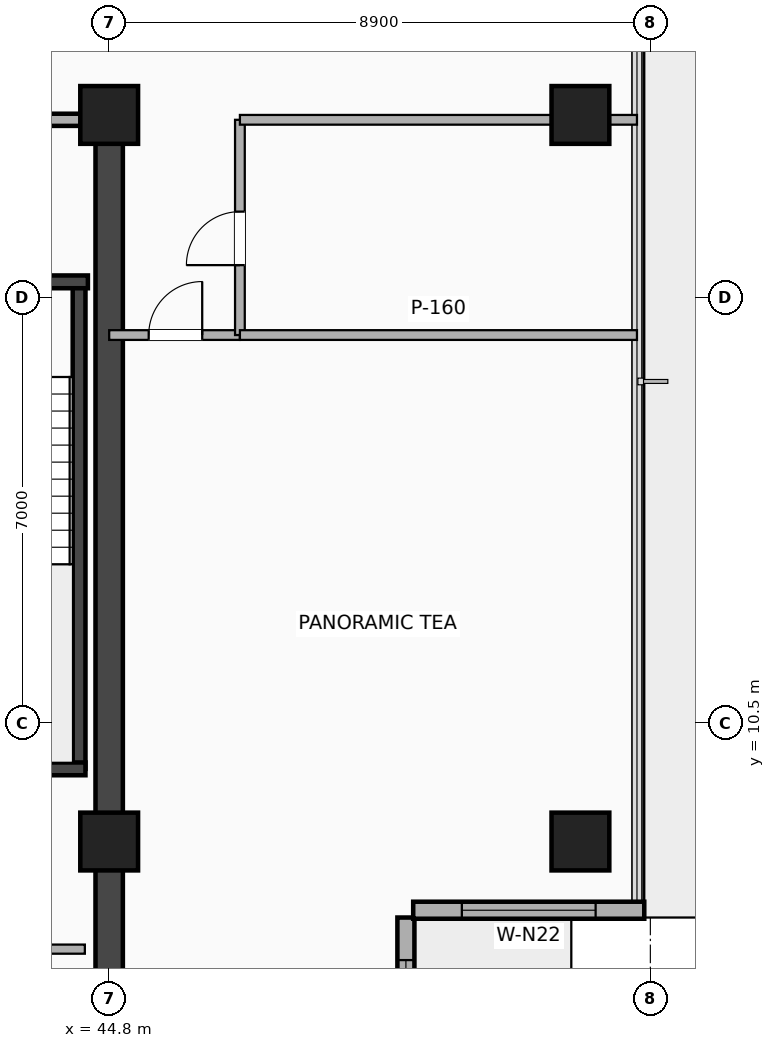
"""IFC4 building model, lengths in metres.
Left out: names, types, materials, properties, quantities, classifications, styles, units other than length and angle.
Written with IfcOpenShell. Run it as: python <this file> out.ifc"""

import sys

from ifc_helpers import new_model, si_unit, direction, frame, frame_2d, origin, origin_2d, place, context, subcontext, project, spatial, rectangle, extrude, element, fill, save


model = new_model("IFC4")
c1 = context("Model", 3, precision=1e-05, world=origin(), true_north=direction((0.0, 1.0)))
c2 = subcontext(c1, "Body", "Model", "MODEL_VIEW")
j1 = project(units=[si_unit("LENGTHUNIT", "METRE"), si_unit("PLANEANGLEUNIT", "RADIAN")], contexts=[c1])
p1 = place(None, origin())
s1 = spatial("IfcSite", under=j1, at=p1, CompositionType="ELEMENT")
p2 = place(p1, origin())
s2 = spatial("IfcBuilding", under=s1, at=p2, CompositionType="ELEMENT")
p3 = place(p2, frame((0.0, 0.0, 192.5)))
s3 = spatial("IfcBuildingStorey", under=s2, at=p3, CompositionType="ELEMENT", Elevation=192.5)
p4 = place(p3, frame((44.8, 3.5, 0.0), z_axis=(0.0, 0.0, 1.0), x_axis=(0.0, 1.0, 0.0)))
e1 = element("IfcWall", 1, at=p4, inside=s3, PredefinedType="SHEAR", context=c2, shape_type="SweptSolid", body=[
    extrude(rectangle(XDim=16.9, YDim=0.45, at=frame_2d((8.45, 0.0))), origin(), (0.0, 0.0, 1.0), 4.16),
])
p5 = place(p3, frame((44.305, 9.745, 0.0), z_axis=(0.0, 0.0, 1.0), x_axis=(0.0, 1.0, 0.0)))
e2 = element("IfcWall", 2, at=p5, inside=s3, PredefinedType="SHEAR", context=c2, shape_type="SweptSolid", body=[
    extrude(rectangle(XDim=8.01, YDim=0.21, at=frame_2d((4.005, 0.0))), origin(), (0.0, 0.0, 1.0), 4.16),
])
p6 = place(p3, frame((40.75, 9.745, 0.0), z_axis=(0.0, 0.0, 1.0), x_axis=(1.0, 0.0, 0.0)))
e3 = element("IfcWall", 3, at=p6, inside=s3, PredefinedType="SHEAR", context=c2, shape_type="SweptSolid", body=[
    extrude(rectangle(XDim=3.66, YDim=0.21, at=frame_2d((1.83, 0.0))), origin(), (0.0, 0.0, 1.0), 4.16),
])
p7 = place(p3, frame((37.25, 17.755, 0.0), z_axis=(0.0, 0.0, 1.0), x_axis=(1.0, 0.0, 0.0)))
e4 = element("IfcWall", 4, at=p7, inside=s3, PredefinedType="SHEAR", context=c2, shape_type="SweptSolid", body=[
    extrude(rectangle(XDim=7.2, YDim=0.21, at=frame_2d((3.6, 0.0))), origin(), (0.0, 0.0, 1.0), 4.16),
])
p8 = place(p7, frame((0.25, 0.0, 0.0)))
e5 = element("IfcOpeningElement", 5, at=p8, cuts=e4, PredefinedType="OPENING", context=c2, shape_type="SweptSolid", body=[
    extrude(rectangle(XDim=1.12, YDim=2.2, at=frame_2d((0.56, 1.1))), frame((0.0, 0.115, 0.0), z_axis=(0.0, -1.0, 0.0), x_axis=(1.0, 0.0, 0.0)), (0.0, 0.0, 1.0), 0.23),
])
p9 = place(p7, frame((2.05, 0.0, 0.0)))
e6 = element("IfcOpeningElement", 6, at=p9, cuts=e4, PredefinedType="OPENING", context=c2, shape_type="SweptSolid", body=[
    extrude(rectangle(XDim=1.1, YDim=2.18, at=frame_2d((0.55, 1.09))), frame((0.0, 0.115, 0.0), z_axis=(0.0, -1.0, 0.0), x_axis=(1.0, 0.0, 0.0)), (0.0, 0.0, 1.0), 0.23),
])
p10 = place(p7, frame((5.78, 0.0, 0.0), z_axis=(0.0, 0.0, 1.0), x_axis=(-1.0, 0.0, 0.0)))
e7 = element("IfcOpeningElement", 7, at=p10, cuts=e4, PredefinedType="OPENING", context=c2, shape_type="SweptSolid", body=[
    extrude(rectangle(XDim=1.05, YDim=2.15, at=frame_2d((0.525, 1.075))), frame((0.0, 0.115, 0.0), z_axis=(0.0, -1.0, 0.0), x_axis=(1.0, 0.0, 0.0)), (0.0, 0.0, 1.0), 0.23),
])
for number, where, z_axis, x_axis in (
    (8, (44.8, 8.55, -0.24), (0.0, 0.0, 1.0), (1.0, 0.0, 0.0)),
    (9, (44.8, 20.5, -0.24), (0.0, 0.0, 1.0), (1.0, 0.0, 0.0)),
    (10, (52.55, 8.55, -0.24), (0.0, 0.0, 1.0), (1.0, 0.0, 0.0)),
    (11, (52.55, 20.5, -0.24), (0.0, 0.0, 1.0), (1.0, 0.0, 0.0)),
):
    element("IfcColumn", number, at=place(p3, frame(where, z_axis=z_axis, x_axis=x_axis)), inside=s3, PredefinedType="COLUMN", context=c2, shape_type="SweptSolid", body=[
        extrude(rectangle(XDim=0.95, YDim=0.95, at=origin_2d()), origin(), (0.0, 0.0, 1.0), 4.4),
    ])
p11 = place(p3, frame((49.68, 3.5, 0.0), z_axis=(0.0, 0.0, 1.0), x_axis=(0.0, 1.0, 0.0)))
e12 = element("IfcWall", 12, at=p11, inside=s3, PredefinedType="SOLIDWALL", context=c2, shape_type="SweptSolid", body=[
    extrude(rectangle(XDim=3.8, YDim=0.28, at=frame_2d((1.9, 0.0))), origin(), (0.0, 0.0, 1.0), 4.16),
])
p12 = place(p11, frame((0.7, 0.0, 0.85)))
e13 = element("IfcOpeningElement", 13, at=p12, cuts=e12, PredefinedType="OPENING", context=c2, shape_type="SweptSolid", body=[
    extrude(rectangle(XDim=2.4, YDim=1.65, at=frame_2d((1.2, 0.825))), frame((0.0, 0.15, 0.0), z_axis=(0.0, -1.0, 0.0), x_axis=(1.0, 0.0, 0.0)), (0.0, 0.0, 1.0), 0.3),
])
p13 = place(p3, frame((49.8, 7.42, 0.0), z_axis=(0.0, 0.0, 1.0), x_axis=(1.0, 0.0, 0.0)))
e14 = element("IfcWall", 14, at=p13, inside=s3, PredefinedType="SOLIDWALL", context=c2, shape_type="SweptSolid", body=[
    extrude(rectangle(XDim=3.8, YDim=0.28, at=frame_2d((1.9, 0.0))), origin(), (0.0, 0.0, 1.0), 4.16),
])
p14 = place(p13, frame((0.8, 0.0, 0.85)))
e15 = element("IfcOpeningElement", 15, at=p14, cuts=e14, PredefinedType="OPENING", context=c2, shape_type="SweptSolid", body=[
    extrude(rectangle(XDim=2.2, YDim=1.65, at=frame_2d((1.1, 0.825))), frame((0.0, 0.15, 0.0), z_axis=(0.0, -1.0, 0.0), x_axis=(1.0, 0.0, 0.0)), (0.0, 0.0, 1.0), 0.3),
])
p15 = place(p3, frame((37.0, 20.42, 0.0), z_axis=(0.0, 0.0, 1.0), x_axis=(1.0, 0.0, 0.0)))
e16 = element("IfcWall", 16, at=p15, inside=s3, PredefinedType="PARTITIONING", context=c2, shape_type="SweptSolid", body=[
    extrude(rectangle(XDim=7.45, YDim=0.2, at=frame_2d((3.725, 0.0))), origin(), (0.0, 0.0, 1.0), 3.372),
])
p16 = place(p15, frame((4.2, 0.0, 0.0)))
e17 = element("IfcOpeningElement", 17, at=p16, cuts=e16, PredefinedType="OPENING", context=c2, shape_type="SweptSolid", body=[
    extrude(rectangle(XDim=1.1, YDim=2.15, at=frame_2d((0.55, 1.075))), frame((0.0, 0.11, 0.0), z_axis=(0.0, -1.0, 0.0), x_axis=(1.0, 0.0, 0.0)), (0.0, 0.0, 1.0), 0.22),
])
p17 = place(p3, frame((41.74, 6.78, 0.0), z_axis=(0.0, 0.0, 1.0), x_axis=(1.0, 0.0, 0.0)))
e18 = element("IfcWall", 18, at=p17, inside=s3, PredefinedType="PARTITIONING", context=c2, shape_type="SweptSolid", body=[
    extrude(rectangle(XDim=2.66, YDim=0.15, at=frame_2d((1.33, 0.0))), origin(), (0.0, 0.0, 1.0), 3.372),
])
p18 = place(p3, frame((44.8, 16.88, 0.0), z_axis=(0.0, 0.0, 1.0), x_axis=(1.0, 0.0, 0.0)))
e19 = element("IfcWall", 19, at=p18, inside=s3, PredefinedType="PARTITIONING", context=c2, shape_type="SweptSolid", body=[
    extrude(rectangle(XDim=2.15, YDim=0.16, at=frame_2d((1.075, 0.0))), origin(), (0.0, 0.0, 1.0), 3.372),
])
p19 = place(p18, frame((1.53, 0.0, 0.0), z_axis=(0.0, 0.0, 1.0), x_axis=(-1.0, 0.0, 0.0)))
e20 = element("IfcOpeningElement", 20, at=p19, cuts=e19, PredefinedType="OPENING", context=c2, shape_type="SweptSolid", body=[
    extrude(rectangle(XDim=0.88, YDim=2.08, at=frame_2d((0.44, 1.04))), frame((0.0, 0.09, 0.0), z_axis=(0.0, -1.0, 0.0), x_axis=(1.0, 0.0, 0.0)), (0.0, 0.0, 1.0), 0.18),
])
p20 = place(p3, frame((46.95, 16.88, 0.0), z_axis=(0.0, 0.0, 1.0), x_axis=(0.0, 1.0, 0.0)))
e21 = element("IfcWall", 21, at=p20, inside=s3, PredefinedType="PARTITIONING", context=c2, shape_type="SweptSolid", body=[
    extrude(rectangle(XDim=3.54, YDim=0.16, at=frame_2d((1.77, 0.0))), origin(), (0.0, 0.0, 1.0), 3.372),
])
p21 = place(p20, frame((2.03, 0.0, 0.0), z_axis=(0.0, 0.0, 1.0), x_axis=(-1.0, 0.0, 0.0)))
e22 = element("IfcOpeningElement", 22, at=p21, cuts=e21, PredefinedType="OPENING", context=c2, shape_type="SweptSolid", body=[
    extrude(rectangle(XDim=0.88, YDim=2.08, at=frame_2d((0.44, 1.04))), frame((0.0, 0.09, 0.0), z_axis=(0.0, -1.0, 0.0), x_axis=(1.0, 0.0, 0.0)), (0.0, 0.0, 1.0), 0.18),
])
p22 = place(p3, frame((46.95, 16.88, 0.0), z_axis=(0.0, 0.0, 1.0), x_axis=(1.0, 0.0, 0.0)))
e23 = element("IfcWall", 23, at=p22, inside=s3, PredefinedType="PARTITIONING", context=c2, shape_type="SweptSolid", body=[
    extrude(rectangle(XDim=6.53, YDim=0.16, at=frame_2d((3.265, 0.0))), origin(), (0.0, 0.0, 1.0), 3.682),
])
p23 = place(p3, frame((46.95, 20.42, 0.0), z_axis=(0.0, 0.0, 1.0), x_axis=(1.0, 0.0, 0.0)))
e24 = element("IfcWall", 24, at=p23, inside=s3, PredefinedType="PARTITIONING", context=c2, shape_type="SweptSolid", body=[
    extrude(rectangle(XDim=6.53, YDim=0.16, at=frame_2d((3.265, 0.0))), origin(), (0.0, 0.0, 1.0), 3.372),
])
p24 = place(p12, origin())
e25 = element("IfcWindow", 25, at=p24, inside=s3, PartitioningType="SINGLE_PANEL", PredefinedType="WINDOW", context=c2, shape_type="SweptSolid", body=[
    extrude(rectangle(XDim=2.4, YDim=1.65, at=frame_2d((1.2, 0.825))), frame((0.0, 0.03, 0.0), z_axis=(0.0, -1.0, 0.0), x_axis=(1.0, 0.0, 0.0)), (0.0, 0.0, 1.0), 0.06),
])
fill(e13, e25)
p25 = place(p14, origin())
e26 = element("IfcWindow", 26, at=p25, inside=s3, PartitioningType="SINGLE_PANEL", PredefinedType="WINDOW", context=c2, shape_type="SweptSolid", body=[
    extrude(rectangle(XDim=2.2, YDim=1.65, at=frame_2d((1.1, 0.825))), frame((0.0, 0.03, 0.0), z_axis=(0.0, -1.0, 0.0), x_axis=(1.0, 0.0, 0.0)), (0.0, 0.0, 1.0), 0.06),
])
fill(e15, e26)
p26 = place(p19, origin())
e27 = element("IfcDoor", 27, at=p26, inside=s3, OperationType="SINGLE_SWING_RIGHT", PredefinedType="DOOR", context=c2, shape_type="SweptSolid", body=[
    extrude(rectangle(XDim=0.88, YDim=2.08, at=frame_2d((0.44, 1.04))), frame((0.0, 0.025, 0.0), z_axis=(0.0, -1.0, 0.0), x_axis=(1.0, 0.0, 0.0)), (0.0, 0.0, 1.0), 0.05),
])
fill(e20, e27)
p27 = place(p21, origin())
e28 = element("IfcDoor", 28, at=p27, inside=s3, OperationType="SINGLE_SWING_LEFT", PredefinedType="DOOR", context=c2, shape_type="SweptSolid", body=[
    extrude(rectangle(XDim=0.88, YDim=2.08, at=frame_2d((0.44, 1.04))), frame((0.0, 0.025, 0.0), z_axis=(0.0, -1.0, 0.0), x_axis=(1.0, 0.0, 0.0)), (0.0, 0.0, 1.0), 0.05),
])
fill(e22, e28)
save(model, sys.argv[1])
